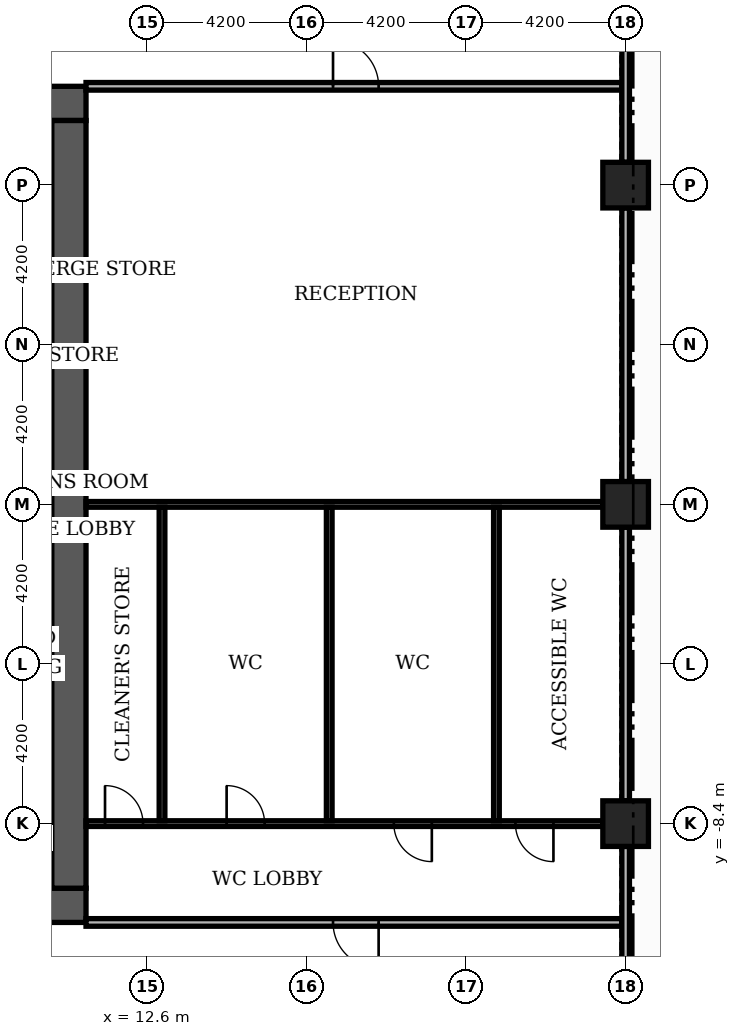
"""IFC4 building model, lengths in metres.
Left out: names, types, materials, properties, quantities, classifications, styles, units other than length and angle.
Written with IfcOpenShell. Run it as: python <this file> out.ifc"""

import sys

from ifc_helpers import new_model, si_unit, direction, frame, frame_2d, origin, origin_2d, place, context, subcontext, project, spatial, rectangle, extrude, element, fill, save


model = new_model("IFC4")
c1 = context("Model", 3, precision=1e-05, world=origin(), true_north=direction((0.0, 1.0)))
c2 = subcontext(c1, "Body", "Model", "MODEL_VIEW")
j1 = project(units=[si_unit("LENGTHUNIT", "METRE"), si_unit("PLANEANGLEUNIT", "RADIAN")], contexts=[c1])
p1 = place(None, origin())
s1 = spatial("IfcSite", under=j1, at=p1, CompositionType="ELEMENT")
p2 = place(p1, origin())
s2 = spatial("IfcBuilding", under=s1, at=p2, CompositionType="ELEMENT")
p3 = place(p2, frame((0.0, 0.0, 12.0)))
s3 = spatial("IfcBuildingStorey", under=s2, at=p3, CompositionType="ELEMENT", Elevation=12.0)
for number, where, z_axis, x_axis in (
    (1, (9.2, -3.0, 0.0), (0.0, 0.0, 1.0), (1.0, 0.0, 0.0)),
    (2, (9.2, 2.4, 0.0), (0.0, 0.0, 1.0), (1.0, 0.0, 0.0)),
):
    element("IfcWall", number, at=place(p3, frame(where, z_axis=z_axis, x_axis=x_axis)), inside=s3, PredefinedType="SHEAR", context=c2, shape_type="SweptSolid", body=[
        extrude(rectangle(XDim=0.9, YDim=0.2, at=frame_2d((0.45, 0.0))), origin(), (0.0, 0.0, 1.0), 4.38),
    ])
p4 = place(p3, frame((-11.0, -10.55, 0.0), z_axis=(0.0, 0.0, 1.0), x_axis=(1.0, 0.0, 0.0)))
e3 = element("IfcWall", 3, at=p4, inside=s3, PredefinedType="SHEAR", context=c2, shape_type="SweptSolid", body=[
    extrude(rectangle(XDim=22.0, YDim=0.9, at=frame_2d((11.0, 0.0))), origin(), (0.0, 0.0, 1.0), 4.38),
])
p5 = place(p4, frame((7.4, 0.0, 0.0)))
e4 = element("IfcOpeningElement", 4, at=p5, cuts=e3, PredefinedType="OPENING", context=c2, shape_type="SweptSolid", body=[
    extrude(rectangle(XDim=1.8, YDim=2.2, at=frame_2d((0.9, 1.1))), frame((0.0, 0.46, 0.0), z_axis=(0.0, -1.0, 0.0), x_axis=(1.0, 0.0, 0.0)), (0.0, 0.0, 1.0), 0.92),
])
p6 = place(p3, frame((-11.0, 10.55, 0.0), z_axis=(0.0, 0.0, 1.0), x_axis=(1.0, 0.0, 0.0)))
e5 = element("IfcWall", 5, at=p6, inside=s3, PredefinedType="SHEAR", context=c2, shape_type="SweptSolid", body=[
    extrude(rectangle(XDim=22.0, YDim=0.9, at=frame_2d((11.0, 0.0))), origin(), (0.0, 0.0, 1.0), 4.38),
])
p7 = place(p6, frame((13.3, 0.0, 0.0)))
e6 = element("IfcOpeningElement", 6, at=p7, cuts=e5, PredefinedType="OPENING", context=c2, shape_type="SweptSolid", body=[
    extrude(rectangle(XDim=1.8, YDim=2.2, at=frame_2d((0.9, 1.1))), frame((0.0, 0.46, 0.0), z_axis=(0.0, -1.0, 0.0), x_axis=(1.0, 0.0, 0.0)), (0.0, 0.0, 1.0), 0.92),
])
p8 = place(p3, frame((10.55, -10.1, 0.0), z_axis=(0.0, 0.0, 1.0), x_axis=(0.0, 1.0, 0.0)))
e7 = element("IfcWall", 7, at=p8, inside=s3, PredefinedType="SHEAR", context=c2, shape_type="SweptSolid", body=[
    extrude(rectangle(XDim=20.2, YDim=0.9, at=frame_2d((10.1, 0.0))), origin(), (0.0, 0.0, 1.0), 4.38),
])
for number, where, z_axis, x_axis in (
    (8, (25.2, 0.0, 0.0), (0.0, 0.0, 1.0), (1.0, 0.0, 0.0)),
    (9, (25.2, 8.4, 0.0), (0.0, 0.0, 1.0), (1.0, 0.0, 0.0)),
    (10, (25.2, -8.4, 0.0), (0.0, 0.0, 1.0), (1.0, 0.0, 0.0)),
):
    element("IfcColumn", number, at=place(p3, frame(where, z_axis=z_axis, x_axis=x_axis)), inside=s3, PredefinedType="COLUMN", context=c2, shape_type="SweptSolid", body=[
        extrude(rectangle(XDim=1.2, YDim=1.2, at=origin_2d()), origin(), (0.0, 0.0, 1.0), 4.8),
    ])
p9 = place(p3, frame((11.0, -11.0, 0.0), z_axis=(0.0, 0.0, 1.0), x_axis=(1.0, 0.0, 0.0)))
e11 = element("IfcWall", 11, at=p9, inside=s3, PredefinedType="PARTITIONING", context=c2, shape_type="SweptSolid", body=[
    extrude(rectangle(XDim=14.1, YDim=0.2, at=frame_2d((7.05, 0.0))), origin(), (0.0, 0.0, 1.0), 4.38),
])
p10 = place(p9, frame((6.5, 0.0, 0.0)))
e12 = element("IfcOpeningElement", 12, at=p10, cuts=e11, PredefinedType="OPENING", context=c2, shape_type="SweptSolid", body=[
    extrude(rectangle(XDim=1.2, YDim=2.2, at=frame_2d((0.6, 1.1))), frame((0.0, 0.11, 0.0), z_axis=(0.0, -1.0, 0.0), x_axis=(1.0, 0.0, 0.0)), (0.0, 0.0, 1.0), 0.22),
])
p11 = place(p3, frame((11.0, -8.4, 0.0), z_axis=(0.0, 0.0, 1.0), x_axis=(1.0, 0.0, 0.0)))
e13 = element("IfcWall", 13, at=p11, inside=s3, PredefinedType="PARTITIONING", context=c2, shape_type="SweptSolid", body=[
    extrude(rectangle(XDim=13.6, YDim=0.15, at=frame_2d((6.8, 0.0))), origin(), (0.0, 0.0, 1.0), 4.38),
])
p12 = place(p11, frame((0.5, 0.0, 0.0)))
e14 = element("IfcOpeningElement", 14, at=p12, cuts=e13, PredefinedType="OPENING", context=c2, shape_type="SweptSolid", body=[
    extrude(rectangle(XDim=1.0, YDim=2.1, at=frame_2d((0.5, 1.05))), frame((0.0, 0.085, 0.0), z_axis=(0.0, -1.0, 0.0), x_axis=(1.0, 0.0, 0.0)), (0.0, 0.0, 1.0), 0.17),
])
p13 = place(p11, frame((3.7, 0.0, 0.0)))
e15 = element("IfcOpeningElement", 15, at=p13, cuts=e13, PredefinedType="OPENING", context=c2, shape_type="SweptSolid", body=[
    extrude(rectangle(XDim=1.0, YDim=2.1, at=frame_2d((0.5, 1.05))), frame((0.0, 0.085, 0.0), z_axis=(0.0, -1.0, 0.0), x_axis=(1.0, 0.0, 0.0)), (0.0, 0.0, 1.0), 0.17),
])
p14 = place(p11, frame((8.1, 0.0, 0.0)))
e16 = element("IfcOpeningElement", 16, at=p14, cuts=e13, PredefinedType="OPENING", context=c2, shape_type="SweptSolid", body=[
    extrude(rectangle(XDim=1.0, YDim=2.1, at=frame_2d((0.5, 1.05))), frame((0.0, 0.085, 0.0), z_axis=(0.0, -1.0, 0.0), x_axis=(1.0, 0.0, 0.0)), (0.0, 0.0, 1.0), 0.17),
])
p15 = place(p11, frame((11.3, 0.0, 0.0)))
e17 = element("IfcOpeningElement", 17, at=p15, cuts=e13, PredefinedType="OPENING", context=c2, shape_type="SweptSolid", body=[
    extrude(rectangle(XDim=1.0, YDim=2.1, at=frame_2d((0.5, 1.05))), frame((0.0, 0.085, 0.0), z_axis=(0.0, -1.0, 0.0), x_axis=(1.0, 0.0, 0.0)), (0.0, 0.0, 1.0), 0.17),
])
p16 = place(p3, frame((11.0, 0.0, 0.0), z_axis=(0.0, 0.0, 1.0), x_axis=(1.0, 0.0, 0.0)))
e18 = element("IfcWall", 18, at=p16, inside=s3, PredefinedType="PARTITIONING", context=c2, shape_type="SweptSolid", body=[
    extrude(rectangle(XDim=13.6, YDim=0.15, at=frame_2d((6.8, 0.0))), origin(), (0.0, 0.0, 1.0), 4.38),
])
p17 = place(p3, frame((11.0, 11.0, 0.0), z_axis=(0.0, 0.0, 1.0), x_axis=(1.0, 0.0, 0.0)))
e19 = element("IfcWall", 19, at=p17, inside=s3, PredefinedType="PARTITIONING", context=c2, shape_type="SweptSolid", body=[
    extrude(rectangle(XDim=14.1, YDim=0.2, at=frame_2d((7.05, 0.0))), origin(), (0.0, 0.0, 1.0), 4.38),
])
p18 = place(p17, frame((6.5, 0.0, 0.0)))
e20 = element("IfcOpeningElement", 20, at=p18, cuts=e19, PredefinedType="OPENING", context=c2, shape_type="SweptSolid", body=[
    extrude(rectangle(XDim=1.2, YDim=2.2, at=frame_2d((0.6, 1.1))), frame((0.0, 0.11, 0.0), z_axis=(0.0, -1.0, 0.0), x_axis=(1.0, 0.0, 0.0)), (0.0, 0.0, 1.0), 0.22),
])
for number, where, z_axis, x_axis in (
    (21, (13.0, -8.325, 0.0), (0.0, 0.0, 1.0), (0.0, 1.0, 0.0)),
    (22, (17.4, -8.325, 0.0), (0.0, 0.0, 1.0), (0.0, 1.0, 0.0)),
    (23, (21.8, -8.325, 0.0), (0.0, 0.0, 1.0), (0.0, 1.0, 0.0)),
):
    element("IfcWall", number, at=place(p3, frame(where, z_axis=z_axis, x_axis=x_axis)), inside=s3, PredefinedType="PARTITIONING", context=c2, shape_type="SweptSolid", body=[
        extrude(rectangle(XDim=8.25, YDim=0.15, at=frame_2d((4.125, 0.0))), origin(), (0.0, 0.0, 1.0), 4.38),
    ])
p19 = place(p3, frame((25.2, -16.2, 0.0), z_axis=(0.0, 0.0, 1.0), x_axis=(0.0, 1.0, 0.0)))
e24 = element("IfcWall", 24, at=p19, inside=s3, PredefinedType="PARTITIONING", context=c2, shape_type="SweptSolid", body=[
    extrude(rectangle(XDim=7.2, YDim=0.2, at=frame_2d((3.6, 0.0))), origin(), (0.0, 0.0, 1.0), 4.08),
])
p20 = place(p19, frame((1.5, 0.0, 0.0)))
e25 = element("IfcOpeningElement", 25, at=p20, cuts=e24, PredefinedType="OPENING", context=c2, shape_type="SweptSolid", body=[
    extrude(rectangle(XDim=1.8, YDim=2.2, at=frame_2d((0.9, 1.1))), frame((0.0, 0.11, 0.0), z_axis=(0.0, -1.0, 0.0), x_axis=(1.0, 0.0, 0.0)), (0.0, 0.0, 1.0), 0.22),
])
for number, where, z_axis, x_axis in (
    (26, (25.2, -7.8, 0.0), (0.0, 0.0, 1.0), (0.0, 1.0, 0.0)),
    (27, (25.2, 0.6, 0.0), (0.0, 0.0, 1.0), (0.0, 1.0, 0.0)),
):
    element("IfcWall", number, at=place(p3, frame(where, z_axis=z_axis, x_axis=x_axis)), inside=s3, PredefinedType="PARTITIONING", context=c2, shape_type="SweptSolid", body=[
        extrude(rectangle(XDim=7.2, YDim=0.2, at=frame_2d((3.6, 0.0))), origin(), (0.0, 0.0, 1.0), 4.08),
    ])
p21 = place(p3, frame((25.2, 9.0, 0.0), z_axis=(0.0, 0.0, 1.0), x_axis=(0.0, 1.0, 0.0)))
e28 = element("IfcWall", 28, at=p21, inside=s3, PredefinedType="PARTITIONING", context=c2, shape_type="SweptSolid", body=[
    extrude(rectangle(XDim=7.2, YDim=0.2, at=frame_2d((3.6, 0.0))), origin(), (0.0, 0.0, 1.0), 4.08),
])
p22 = place(p21, frame((3.9, 0.0, 0.0)))
e29 = element("IfcOpeningElement", 29, at=p22, cuts=e28, PredefinedType="OPENING", context=c2, shape_type="SweptSolid", body=[
    extrude(rectangle(XDim=1.8, YDim=2.2, at=frame_2d((0.9, 1.1))), frame((0.0, 0.11, 0.0), z_axis=(0.0, -1.0, 0.0), x_axis=(1.0, 0.0, 0.0)), (0.0, 0.0, 1.0), 0.22),
])
p23 = place(p10, origin())
e30 = element("IfcDoor", 30, at=p23, inside=s3, OperationType="SINGLE_SWING_RIGHT", PredefinedType="DOOR", context=c2, shape_type="SweptSolid", body=[
    extrude(rectangle(XDim=1.2, YDim=2.2, at=frame_2d((0.6, 1.1))), frame((0.0, 0.025, 0.0), z_axis=(0.0, -1.0, 0.0), x_axis=(1.0, 0.0, 0.0)), (0.0, 0.0, 1.0), 0.05),
])
fill(e12, e30)
p24 = place(p12, origin())
e31 = element("IfcDoor", 31, at=p24, inside=s3, OperationType="SINGLE_SWING_LEFT", PredefinedType="DOOR", context=c2, shape_type="SweptSolid", body=[
    extrude(rectangle(XDim=1.0, YDim=2.1, at=frame_2d((0.5, 1.05))), frame((0.0, 0.025, 0.0), z_axis=(0.0, -1.0, 0.0), x_axis=(1.0, 0.0, 0.0)), (0.0, 0.0, 1.0), 0.05),
])
fill(e14, e31)
p25 = place(p13, origin())
e32 = element("IfcDoor", 32, at=p25, inside=s3, OperationType="SINGLE_SWING_LEFT", PredefinedType="DOOR", context=c2, shape_type="SweptSolid", body=[
    extrude(rectangle(XDim=1.0, YDim=2.1, at=frame_2d((0.5, 1.05))), frame((0.0, 0.025, 0.0), z_axis=(0.0, -1.0, 0.0), x_axis=(1.0, 0.0, 0.0)), (0.0, 0.0, 1.0), 0.05),
])
fill(e15, e32)
p26 = place(p14, origin())
e33 = element("IfcDoor", 33, at=p26, inside=s3, OperationType="SINGLE_SWING_RIGHT", PredefinedType="DOOR", context=c2, shape_type="SweptSolid", body=[
    extrude(rectangle(XDim=1.0, YDim=2.1, at=frame_2d((0.5, 1.05))), frame((0.0, 0.025, 0.0), z_axis=(0.0, -1.0, 0.0), x_axis=(1.0, 0.0, 0.0)), (0.0, 0.0, 1.0), 0.05),
])
fill(e16, e33)
p27 = place(p15, origin())
e34 = element("IfcDoor", 34, at=p27, inside=s3, OperationType="SINGLE_SWING_RIGHT", PredefinedType="DOOR", context=c2, shape_type="SweptSolid", body=[
    extrude(rectangle(XDim=1.0, YDim=2.1, at=frame_2d((0.5, 1.05))), frame((0.0, 0.025, 0.0), z_axis=(0.0, -1.0, 0.0), x_axis=(1.0, 0.0, 0.0)), (0.0, 0.0, 1.0), 0.05),
])
fill(e17, e34)
p28 = place(p18, origin())
e35 = element("IfcDoor", 35, at=p28, inside=s3, OperationType="SINGLE_SWING_LEFT", PredefinedType="DOOR", context=c2, shape_type="SweptSolid", body=[
    extrude(rectangle(XDim=1.2, YDim=2.2, at=frame_2d((0.6, 1.1))), frame((0.0, 0.025, 0.0), z_axis=(0.0, -1.0, 0.0), x_axis=(1.0, 0.0, 0.0)), (0.0, 0.0, 1.0), 0.05),
])
fill(e20, e35)
save(model, sys.argv[1])
